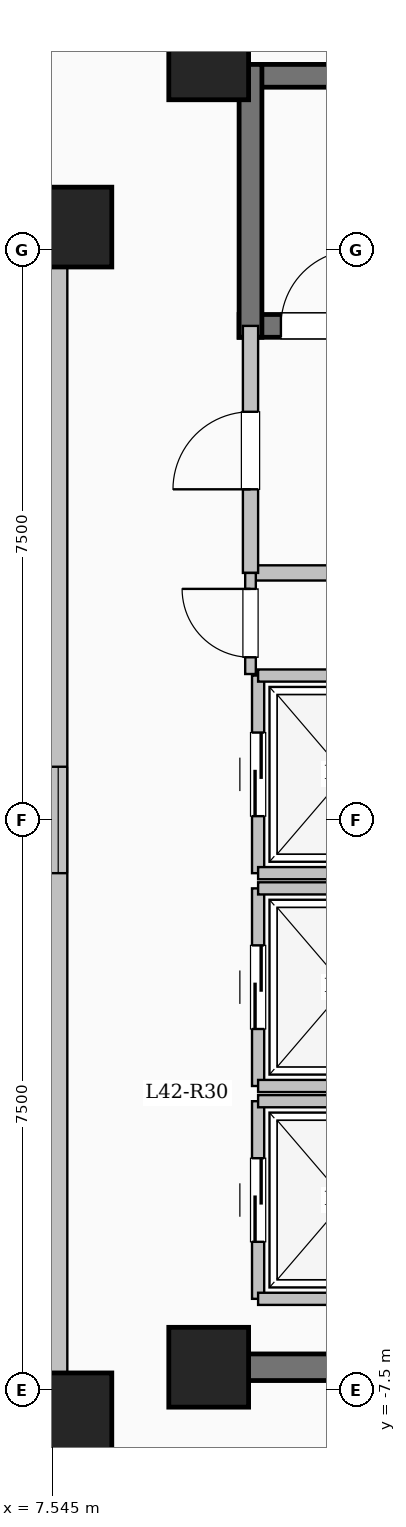
"""IFC4 building model, lengths in metres.
Left out: names, types, materials, properties, quantities, classifications, styles, units other than length and angle.
Written with IfcOpenShell. Run it as: python <this file> out.ifc"""

import sys

from ifc_helpers import new_model, si_unit, direction, frame, frame_2d, origin, origin_2d, place, context, subcontext, project, spatial, rectangle, extrude, element, fill, save


model = new_model("IFC4")
c1 = context("Model", 3, precision=1e-05, world=origin(), true_north=direction((0.0, 1.0)))
c2 = subcontext(c1, "Body", "Model", "MODEL_VIEW")
j1 = project(units=[si_unit("LENGTHUNIT", "METRE"), si_unit("PLANEANGLEUNIT", "RADIAN")], contexts=[c1])
p1 = place(None, origin())
s1 = spatial("IfcSite", under=j1, at=p1, CompositionType="ELEMENT")
p2 = place(p1, origin())
s2 = spatial("IfcBuilding", under=s1, at=p2, CompositionType="ELEMENT")
p3 = place(p2, frame((0.0, 0.0, 156.05)))
s3 = spatial("IfcBuildingStorey", under=s2, at=p3, CompositionType="ELEMENT", Elevation=156.05)
for number, where, z_axis, x_axis in (
    (1, (7.8, -7.8, 0.0), (0.0, 0.0, 1.0), (1.0, 0.0, 0.0)),
    (2, (7.8, 7.8, 0.0), (0.0, 0.0, 1.0), (1.0, 0.0, 0.0)),
    (3, (9.6, -7.2, 0.0), (0.0, 0.0, 1.0), (1.0, 0.0, 0.0)),
    (4, (9.6, 10.0, 0.0), (0.0, 0.0, 1.0), (1.0, 0.0, 0.0)),
):
    element("IfcColumn", number, at=place(p3, frame(where, z_axis=z_axis, x_axis=x_axis)), inside=s3, PredefinedType="COLUMN", context=c2, shape_type="SweptSolid", body=[
        extrude(rectangle(XDim=1.05, YDim=1.05, at=origin_2d()), origin(), (0.0, 0.0, 1.0), 3.35),
    ])
p4 = place(p3, frame((-7.62, -7.62, 0.0), z_axis=(0.0, 0.0, 1.0), x_axis=(1.0, 0.0, 0.0)))
e5 = element("IfcWall", 5, at=p4, inside=s3, PredefinedType="SOLIDWALL", context=c2, shape_type="SweptSolid", body=[
    extrude(rectangle(XDim=15.24, YDim=0.24, at=frame_2d((7.62, 0.0))), origin(), (0.0, 0.0, 1.0), 3.1),
])
p5 = place(p4, frame((6.92, 0.0, 0.95)))
e6 = element("IfcOpeningElement", 6, at=p5, cuts=e5, PredefinedType="OPENING", context=c2, shape_type="SweptSolid", body=[
    extrude(rectangle(XDim=1.4, YDim=1.5, at=frame_2d((0.7, 0.75))), frame((0.0, 0.13, 0.0), z_axis=(0.0, -1.0, 0.0), x_axis=(1.0, 0.0, 0.0)), (0.0, 0.0, 1.0), 0.26),
])
p6 = place(p3, frame((7.62, -7.62, 0.0), z_axis=(0.0, 0.0, 1.0), x_axis=(0.0, 1.0, 0.0)))
e7 = element("IfcWall", 7, at=p6, inside=s3, PredefinedType="SOLIDWALL", context=c2, shape_type="SweptSolid", body=[
    extrude(rectangle(XDim=15.24, YDim=0.24, at=frame_2d((7.62, 0.0))), origin(), (0.0, 0.0, 1.0), 3.1),
])
p7 = place(p6, frame((6.92, 0.0, 0.95)))
e8 = element("IfcOpeningElement", 8, at=p7, cuts=e7, PredefinedType="OPENING", context=c2, shape_type="SweptSolid", body=[
    extrude(rectangle(XDim=1.4, YDim=1.5, at=frame_2d((0.7, 0.75))), frame((0.0, 0.13, 0.0), z_axis=(0.0, -1.0, 0.0), x_axis=(1.0, 0.0, 0.0)), (0.0, 0.0, 1.0), 0.26),
])
p8 = place(p3, frame((7.62, 7.62, 0.0), z_axis=(0.0, 0.0, 1.0), x_axis=(-1.0, 0.0, 0.0)))
e9 = element("IfcWall", 9, at=p8, inside=s3, PredefinedType="SOLIDWALL", context=c2, shape_type="SweptSolid", body=[
    extrude(rectangle(XDim=15.24, YDim=0.24, at=frame_2d((7.62, 0.0))), origin(), (0.0, 0.0, 1.0), 3.1),
])
p9 = place(p8, frame((6.92, 0.0, 0.95)))
e10 = element("IfcOpeningElement", 10, at=p9, cuts=e9, PredefinedType="OPENING", context=c2, shape_type="SweptSolid", body=[
    extrude(rectangle(XDim=1.4, YDim=1.5, at=frame_2d((0.7, 0.75))), frame((0.0, 0.13, 0.0), z_axis=(0.0, -1.0, 0.0), x_axis=(1.0, 0.0, 0.0)), (0.0, 0.0, 1.0), 0.26),
])
p10 = place(p3, frame((10.0, 9.79, 0.0), z_axis=(0.0, 0.0, 1.0), x_axis=(1.0, 0.0, 0.0)))
e11 = element("IfcWall", 11, at=p10, inside=s3, PredefinedType="SHEAR", context=c2, shape_type="SweptSolid", body=[
    extrude(rectangle(XDim=8.0, YDim=0.3, at=frame_2d((4.0, 0.0))), origin(), (0.0, 0.0, 1.0), 3.35),
])
p11 = place(p3, frame((10.0, 6.5, 0.0), z_axis=(0.0, 0.0, 1.0), x_axis=(1.0, 0.0, 0.0)))
e12 = element("IfcWall", 12, at=p11, inside=s3, PredefinedType="SHEAR", context=c2, shape_type="SweptSolid", body=[
    extrude(rectangle(XDim=8.0, YDim=0.3, at=frame_2d((4.0, 0.0))), origin(), (0.0, 0.0, 1.0), 3.35),
])
p12 = place(p11, frame((0.55, 0.0, 0.0)))
e13 = element("IfcOpeningElement", 13, at=p12, cuts=e12, PredefinedType="OPENING", context=c2, shape_type="SweptSolid", body=[
    extrude(rectangle(XDim=1.0, YDim=2.15, at=frame_2d((0.5, 1.075))), frame((0.0, 0.16, 0.0), z_axis=(0.0, -1.0, 0.0), x_axis=(1.0, 0.0, 0.0)), (0.0, 0.0, 1.0), 0.32),
])
p13 = place(p3, frame((10.15, 6.35, 0.0), z_axis=(0.0, 0.0, 1.0), x_axis=(0.0, 1.0, 0.0)))
e14 = element("IfcWall", 14, at=p13, inside=s3, PredefinedType="SHEAR", context=c2, shape_type="SweptSolid", body=[
    extrude(rectangle(XDim=3.59, YDim=0.3, at=frame_2d((1.795, 0.0))), origin(), (0.0, 0.0, 1.0), 3.35),
])
p14 = place(p3, frame((10.15, 3.25, 0.0), z_axis=(0.0, 0.0, 1.0), x_axis=(1.0, 0.0, 0.0)))
e15 = element("IfcWall", 15, at=p14, inside=s3, PredefinedType="SOLIDWALL", context=c2, shape_type="SweptSolid", body=[
    extrude(rectangle(XDim=5.4, YDim=0.2, at=frame_2d((2.7, 0.0))), origin(), (0.0, 0.0, 1.0), 3.1),
])
p15 = place(p3, frame((10.15, 3.25, 0.0), z_axis=(0.0, 0.0, 1.0), x_axis=(0.0, 1.0, 0.0)))
e16 = element("IfcWall", 16, at=p15, inside=s3, PredefinedType="SOLIDWALL", context=c2, shape_type="SweptSolid", body=[
    extrude(rectangle(XDim=3.25, YDim=0.2, at=frame_2d((1.625, 0.0))), origin(), (0.0, 0.0, 1.0), 3.1),
])
p16 = place(p15, frame((1.1, 0.0, 0.0)))
e17 = element("IfcOpeningElement", 17, at=p16, cuts=e16, PredefinedType="OPENING", context=c2, shape_type="SweptSolid", body=[
    extrude(rectangle(XDim=1.02, YDim=2.15, at=frame_2d((0.51, 1.075))), frame((0.0, 0.11, 0.0), z_axis=(0.0, -1.0, 0.0), x_axis=(1.0, 0.0, 0.0)), (0.0, 0.0, 1.0), 0.22),
])
p17 = place(p3, frame((10.25, -6.3, 0.0), z_axis=(0.0, 0.0, 1.0), x_axis=(0.0, 1.0, 0.0)))
e18 = element("IfcWall", 18, at=p17, inside=s3, PredefinedType="SOLIDWALL", context=c2, shape_type="SweptSolid", body=[
    extrude(rectangle(XDim=2.6, YDim=0.16, at=frame_2d((1.3, 0.0))), origin(), (0.0, 0.0, 1.0), 3.1),
])
p18 = place(p17, frame((0.75, 0.0, 0.0)))
e19 = element("IfcOpeningElement", 19, at=p18, cuts=e18, PredefinedType="OPENING", context=c2, shape_type="SweptSolid", body=[
    extrude(rectangle(XDim=1.1, YDim=2.15, at=frame_2d((0.55, 1.075))), frame((0.0, 0.09, 0.0), z_axis=(0.0, -1.0, 0.0), x_axis=(1.0, 0.0, 0.0)), (0.0, 0.0, 1.0), 0.18),
])
for number, where, z_axis, x_axis in (
    (20, (10.25, -6.3, 0.0), (0.0, 0.0, 1.0), (1.0, 0.0, 0.0)),
    (21, (10.25, -3.7, 0.0), (0.0, 0.0, 1.0), (1.0, 0.0, 0.0)),
):
    element("IfcWall", number, at=place(p3, frame(where, z_axis=z_axis, x_axis=x_axis)), inside=s3, PredefinedType="SOLIDWALL", context=c2, shape_type="SweptSolid", body=[
        extrude(rectangle(XDim=2.3, YDim=0.16, at=frame_2d((1.15, 0.0))), origin(), (0.0, 0.0, 1.0), 3.1),
    ])
p19 = place(p3, frame((10.25, -3.5, 0.0), z_axis=(0.0, 0.0, 1.0), x_axis=(0.0, 1.0, 0.0)))
e22 = element("IfcWall", 22, at=p19, inside=s3, PredefinedType="SOLIDWALL", context=c2, shape_type="SweptSolid", body=[
    extrude(rectangle(XDim=2.6, YDim=0.16, at=frame_2d((1.3, 0.0))), origin(), (0.0, 0.0, 1.0), 3.1),
])
p20 = place(p19, frame((0.75, 0.0, 0.0)))
e23 = element("IfcOpeningElement", 23, at=p20, cuts=e22, PredefinedType="OPENING", context=c2, shape_type="SweptSolid", body=[
    extrude(rectangle(XDim=1.1, YDim=2.15, at=frame_2d((0.55, 1.075))), frame((0.0, 0.09, 0.0), z_axis=(0.0, -1.0, 0.0), x_axis=(1.0, 0.0, 0.0)), (0.0, 0.0, 1.0), 0.18),
])
for number, where, z_axis, x_axis in (
    (24, (10.25, -3.5, 0.0), (0.0, 0.0, 1.0), (1.0, 0.0, 0.0)),
    (25, (10.25, -0.9, 0.0), (0.0, 0.0, 1.0), (1.0, 0.0, 0.0)),
):
    element("IfcWall", number, at=place(p3, frame(where, z_axis=z_axis, x_axis=x_axis)), inside=s3, PredefinedType="SOLIDWALL", context=c2, shape_type="SweptSolid", body=[
        extrude(rectangle(XDim=2.3, YDim=0.16, at=frame_2d((1.15, 0.0))), origin(), (0.0, 0.0, 1.0), 3.1),
    ])
p21 = place(p3, frame((10.25, -0.7, 0.0), z_axis=(0.0, 0.0, 1.0), x_axis=(0.0, 1.0, 0.0)))
e26 = element("IfcWall", 26, at=p21, inside=s3, PredefinedType="SOLIDWALL", context=c2, shape_type="SweptSolid", body=[
    extrude(rectangle(XDim=2.6, YDim=0.16, at=frame_2d((1.3, 0.0))), origin(), (0.0, 0.0, 1.0), 3.1),
])
p22 = place(p21, frame((0.75, 0.0, 0.0)))
e27 = element("IfcOpeningElement", 27, at=p22, cuts=e26, PredefinedType="OPENING", context=c2, shape_type="SweptSolid", body=[
    extrude(rectangle(XDim=1.1, YDim=2.15, at=frame_2d((0.55, 1.075))), frame((0.0, 0.09, 0.0), z_axis=(0.0, -1.0, 0.0), x_axis=(1.0, 0.0, 0.0)), (0.0, 0.0, 1.0), 0.18),
])
for number, where, z_axis, x_axis in (
    (28, (10.25, -0.7, 0.0), (0.0, 0.0, 1.0), (1.0, 0.0, 0.0)),
    (29, (10.25, 1.9, 0.0), (0.0, 0.0, 1.0), (1.0, 0.0, 0.0)),
):
    element("IfcWall", number, at=place(p3, frame(where, z_axis=z_axis, x_axis=x_axis)), inside=s3, PredefinedType="SOLIDWALL", context=c2, shape_type="SweptSolid", body=[
        extrude(rectangle(XDim=2.3, YDim=0.16, at=frame_2d((1.15, 0.0))), origin(), (0.0, 0.0, 1.0), 3.1),
    ])
p23 = place(p3, frame((10.075, -7.2, 0.0), z_axis=(0.0, 0.0, 1.0), x_axis=(1.0, 0.0, 0.0)))
e30 = element("IfcWall", 30, at=p23, inside=s3, PredefinedType="SHEAR", context=c2, shape_type="SweptSolid", body=[
    extrude(rectangle(XDim=8.55, YDim=0.35, at=frame_2d((4.275, 0.0))), origin(), (0.0, 0.0, 1.0), 3.35),
])
p24 = place(p3, frame((10.15, 1.92, 0.0), z_axis=(0.0, 0.0, 1.0), x_axis=(0.0, 1.0, 0.0)))
e31 = element("IfcWall", 31, at=p24, inside=s3, PredefinedType="PARTITIONING", context=c2, shape_type="SweptSolid", body=[
    extrude(rectangle(XDim=1.33, YDim=0.14, at=frame_2d((0.665, 0.0))), origin(), (0.0, 0.0, 1.0), 3.1),
])
p25 = place(p24, frame((0.22, 0.0, 0.0)))
e32 = element("IfcOpeningElement", 32, at=p25, cuts=e31, PredefinedType="OPENING", context=c2, shape_type="SweptSolid", body=[
    extrude(rectangle(XDim=0.9, YDim=2.08, at=frame_2d((0.45, 1.04))), frame((0.0, 0.08, 0.0), z_axis=(0.0, -1.0, 0.0), x_axis=(1.0, 0.0, 0.0)), (0.0, 0.0, 1.0), 0.16),
])
p26 = place(p7, origin())
e33 = element("IfcWindow", 33, at=p26, inside=s3, PartitioningType="SINGLE_PANEL", PredefinedType="WINDOW", context=c2, shape_type="SweptSolid", body=[
    extrude(rectangle(XDim=1.4, YDim=1.5, at=frame_2d((0.7, 0.75))), frame((0.0, 0.03, 0.0), z_axis=(0.0, -1.0, 0.0), x_axis=(1.0, 0.0, 0.0)), (0.0, 0.0, 1.0), 0.06),
])
fill(e8, e33)
p27 = place(p12, origin())
e34 = element("IfcDoor", 34, at=p27, inside=s3, OperationType="SINGLE_SWING_RIGHT", PredefinedType="DOOR", context=c2, shape_type="SweptSolid", body=[
    extrude(rectangle(XDim=1.0, YDim=2.15, at=frame_2d((0.5, 1.075))), frame((0.0, 0.025, 0.0), z_axis=(0.0, -1.0, 0.0), x_axis=(1.0, 0.0, 0.0)), (0.0, 0.0, 1.0), 0.05),
])
fill(e13, e34)
p28 = place(p16, origin())
e35 = element("IfcDoor", 35, at=p28, inside=s3, OperationType="SINGLE_SWING_LEFT", PredefinedType="DOOR", context=c2, shape_type="SweptSolid", body=[
    extrude(rectangle(XDim=1.02, YDim=2.15, at=frame_2d((0.51, 1.075))), frame((0.0, 0.025, 0.0), z_axis=(0.0, -1.0, 0.0), x_axis=(1.0, 0.0, 0.0)), (0.0, 0.0, 1.0), 0.05),
])
fill(e17, e35)
p29 = place(p18, origin())
e36 = element("IfcDoor", 36, at=p29, inside=s3, OperationType="SLIDING_TO_LEFT", PredefinedType="DOOR", context=c2, shape_type="SweptSolid", body=[
    extrude(rectangle(XDim=1.1, YDim=2.15, at=frame_2d((0.55, 1.075))), frame((0.0, 0.025, 0.0), z_axis=(0.0, -1.0, 0.0), x_axis=(1.0, 0.0, 0.0)), (0.0, 0.0, 1.0), 0.05),
])
fill(e19, e36)
p30 = place(p20, origin())
e37 = element("IfcDoor", 37, at=p30, inside=s3, OperationType="SLIDING_TO_LEFT", PredefinedType="DOOR", context=c2, shape_type="SweptSolid", body=[
    extrude(rectangle(XDim=1.1, YDim=2.15, at=frame_2d((0.55, 1.075))), frame((0.0, 0.025, 0.0), z_axis=(0.0, -1.0, 0.0), x_axis=(1.0, 0.0, 0.0)), (0.0, 0.0, 1.0), 0.05),
])
fill(e23, e37)
p31 = place(p22, origin())
e38 = element("IfcDoor", 38, at=p31, inside=s3, OperationType="SLIDING_TO_LEFT", PredefinedType="DOOR", context=c2, shape_type="SweptSolid", body=[
    extrude(rectangle(XDim=1.1, YDim=2.15, at=frame_2d((0.55, 1.075))), frame((0.0, 0.025, 0.0), z_axis=(0.0, -1.0, 0.0), x_axis=(1.0, 0.0, 0.0)), (0.0, 0.0, 1.0), 0.05),
])
fill(e27, e38)
p32 = place(p25, origin())
e39 = element("IfcDoor", 39, at=p32, inside=s3, OperationType="SINGLE_SWING_RIGHT", PredefinedType="DOOR", context=c2, shape_type="SweptSolid", body=[
    extrude(rectangle(XDim=0.9, YDim=2.08, at=frame_2d((0.45, 1.04))), frame((0.0, 0.025, 0.0), z_axis=(0.0, -1.0, 0.0), x_axis=(1.0, 0.0, 0.0)), (0.0, 0.0, 1.0), 0.05),
])
fill(e32, e39)
save(model, sys.argv[1])
